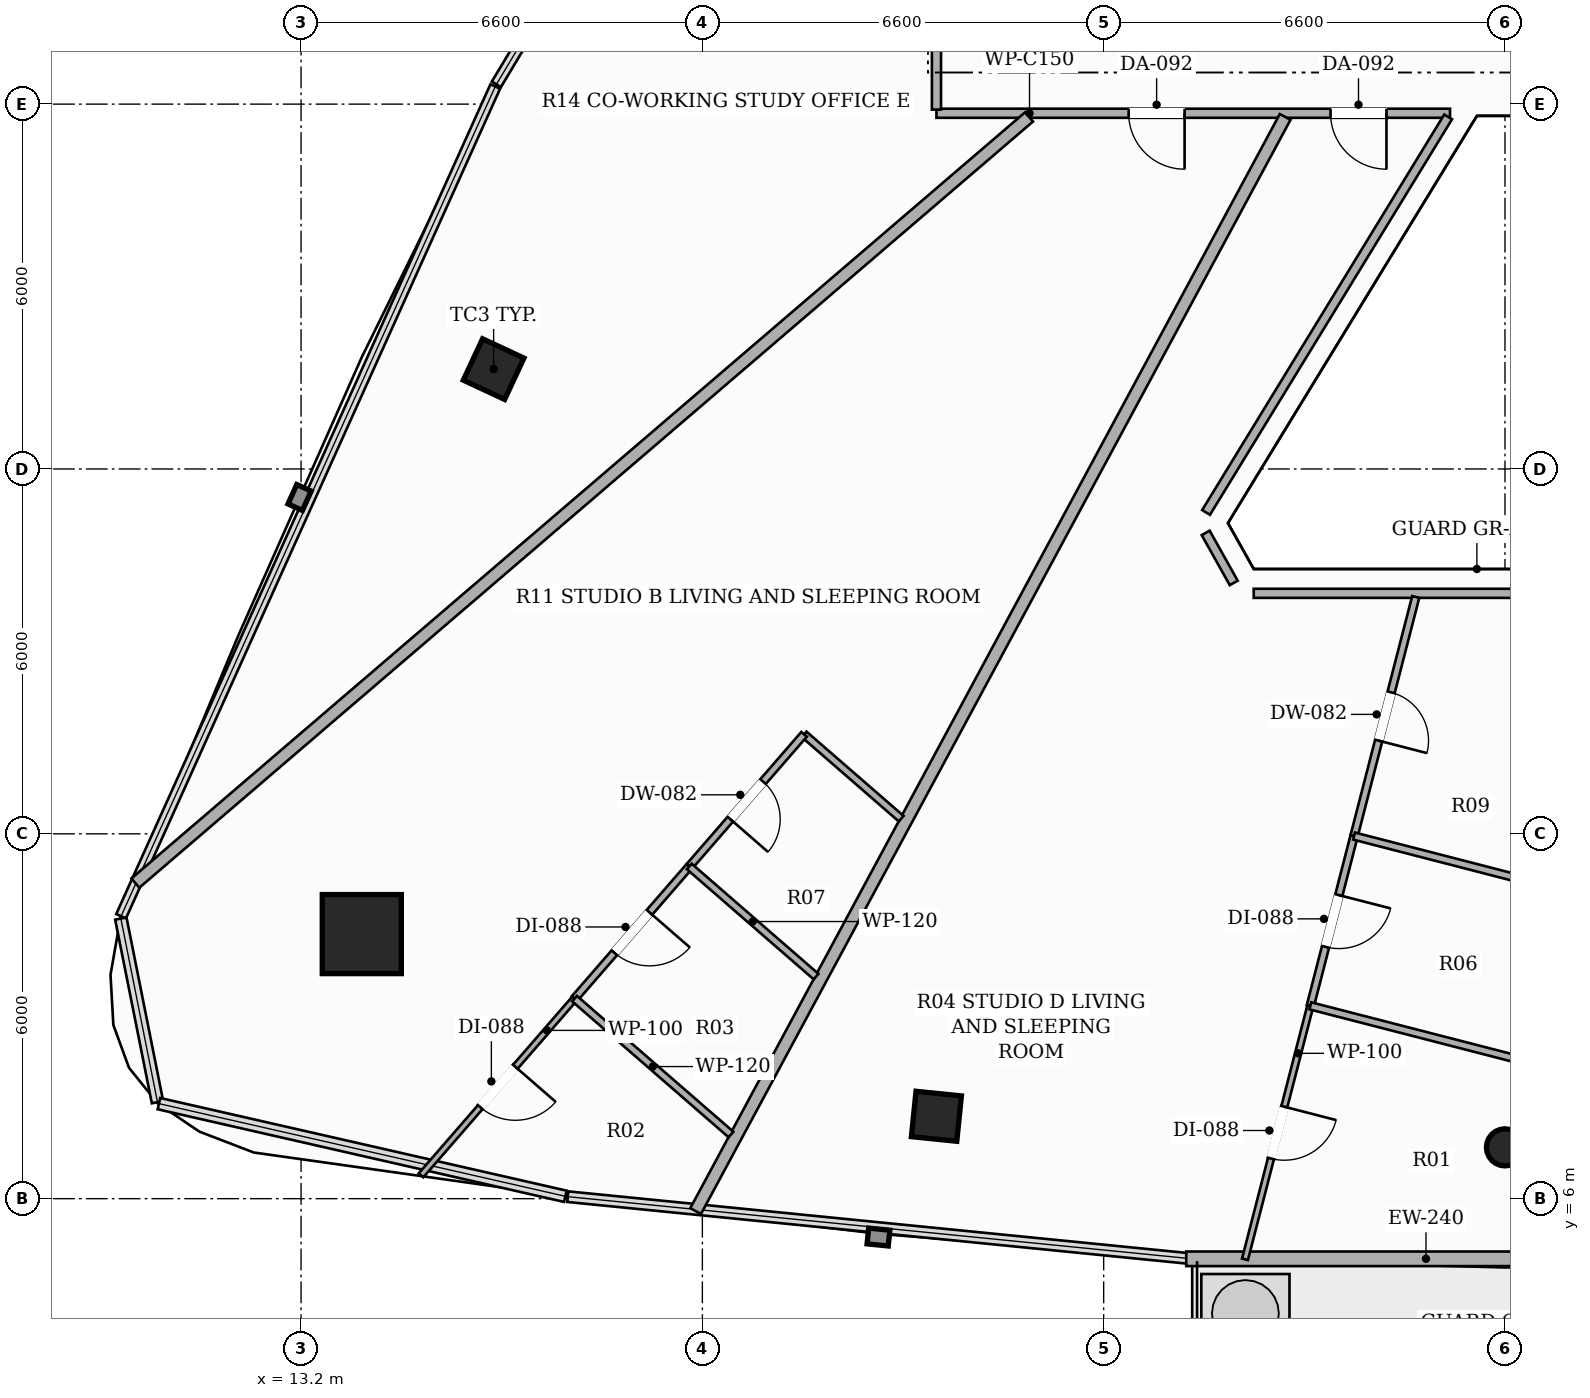
"""IFC4 building model, lengths in metres.
Left out: names, types, materials, properties, quantities, classifications, styles, units other than length and angle.
Written with IfcOpenShell. Run it as: python <this file> out.ifc"""

import sys

from ifc_helpers import new_model, si_unit, direction, frame, frame_2d, origin, origin_2d, place, context, subcontext, project, spatial, rectangle, hollow_rectangle, hollow_circle, extrude, element, fill, save


model = new_model("IFC4")
c1 = context("Model", 3, precision=1e-05, world=origin(), true_north=direction((0.0, 1.0)))
c2 = subcontext(c1, "Body", "Model", "MODEL_VIEW")
j1 = project(units=[si_unit("LENGTHUNIT", "METRE"), si_unit("PLANEANGLEUNIT", "RADIAN")], contexts=[c1])
p1 = place(None, origin())
s1 = spatial("IfcSite", under=j1, at=p1, CompositionType="ELEMENT")
p2 = place(p1, origin())
s2 = spatial("IfcBuilding", under=s1, at=p2, CompositionType="ELEMENT")
p3 = place(p2, frame((0.0, 0.0, 226.1)))
s3 = spatial("IfcBuildingStorey", under=s2, at=p3, CompositionType="ELEMENT", Elevation=226.1)
p4 = place(p3, frame((14.199, 10.351, 0.0), z_axis=(0.0, 0.0, 1.0), x_axis=(1.0, 0.0, 0.0)))
e1 = element("IfcColumn", 1, at=p4, inside=s3, PredefinedType="COLUMN", context=c2, shape_type="SweptSolid", body=[
    extrude(hollow_rectangle(XDim=1.3, YDim=1.3, WallThickness=0.04, at=origin_2d()), origin(), (0.0, 0.0, 1.0), 3.3),
])
for number, where, z_axis, x_axis in (
    (2, (16.367, 19.642, 0.0), (0.0, 0.0, 1.0), (0.423, 0.906, 0.0)),
    (3, (23.649, 7.355, 0.0), (0.0, 0.0, 1.0), (-0.995, 0.101, 0.0)),
):
    element("IfcColumn", number, at=place(p3, frame(where, z_axis=z_axis, x_axis=x_axis)), inside=s3, PredefinedType="COLUMN", context=c2, shape_type="SweptSolid", body=[
        extrude(hollow_rectangle(XDim=0.75, YDim=0.75, WallThickness=0.025, at=origin_2d()), origin(), (0.0, 0.0, 1.0), 3.3),
    ])
p5 = place(p3, frame((33.0, 6.844, 0.0), z_axis=(0.0, 0.0, 1.0), x_axis=(1.0, 0.0, 0.0)))
e4 = element("IfcColumn", 4, at=p5, inside=s3, PredefinedType="COLUMN", context=c2, shape_type="SweptSolid", body=[
    extrude(hollow_circle(Radius=0.305, WallThickness=0.016, at=origin_2d()), origin(), (0.0, 0.0, 1.0), 3.3),
])
p6 = place(p3, frame((27.758, 5.011, 0.0), z_axis=(0.0, 0.0, 1.0), x_axis=(1.0, 0.0, 0.0)))
e5 = element("IfcWall", 5, at=p6, inside=s3, PredefinedType="SOLIDWALL", context=c2, shape_type="SweptSolid", body=[
    extrude(rectangle(XDim=10.484, YDim=0.24, at=frame_2d((5.242, 0.0))), origin(), (0.0, 0.0, 1.0), 2.624),
])
p7 = place(p6, frame((7.986, 0.0, 0.0)))
e6 = element("IfcOpeningElement", 6, at=p7, cuts=e5, PredefinedType="OPENING", context=c2, shape_type="SweptSolid", body=[
    extrude(rectangle(XDim=1.8, YDim=2.2, at=frame_2d((0.9, 1.1))), frame((0.0, 0.13, 0.0), z_axis=(0.0, -1.0, 0.0), x_axis=(1.0, 0.0, 0.0)), (0.0, 0.0, 1.0), 0.26),
])
p8 = place(p3, frame((32.096, 23.85, 0.0), z_axis=(0.0, 0.0, 1.0), x_axis=(-1.0, 0.0, 0.0)))
e7 = element("IfcWall", 7, at=p8, inside=s3, PredefinedType="PARTITIONING", context=c2, shape_type="SweptSolid", body=[
    extrude(rectangle(XDim=8.446, YDim=0.15, at=frame_2d((4.223, 0.0))), origin(), (0.0, 0.0, 1.0), 2.565),
])
p9 = place(p8, frame((4.365, 0.0, 0.0)))
e8 = element("IfcOpeningElement", 8, at=p9, cuts=e7, PredefinedType="OPENING", context=c2, shape_type="SweptSolid", body=[
    extrude(rectangle(XDim=0.92, YDim=2.15, at=frame_2d((0.46, 1.075))), frame((0.0, 0.085, 0.0), z_axis=(0.0, -1.0, 0.0), x_axis=(1.0, 0.0, 0.0)), (0.0, 0.0, 1.0), 0.17),
])
p10 = place(p8, frame((1.045, 0.0, 0.0)))
e9 = element("IfcOpeningElement", 9, at=p10, cuts=e7, PredefinedType="OPENING", context=c2, shape_type="SweptSolid", body=[
    extrude(rectangle(XDim=0.92, YDim=2.15, at=frame_2d((0.46, 1.075))), frame((0.0, 0.085, 0.0), z_axis=(0.0, -1.0, 0.0), x_axis=(1.0, 0.0, 0.0)), (0.0, 0.0, 1.0), 0.17),
])
p11 = place(p3, frame((23.65, 23.91, 0.0), z_axis=(0.0, 0.0, 1.0), x_axis=(0.0, 1.0, 0.0)))
e10 = element("IfcWall", 10, at=p11, inside=s3, PredefinedType="PARTITIONING", context=c2, shape_type="SweptSolid", body=[
    extrude(rectangle(XDim=11.888, YDim=0.15, at=frame_2d((5.944, 0.0))), origin(), (0.0, 0.0, 1.0), 2.492),
])
p12 = place(p11, frame((5.504, 0.0, 0.0)))
e11 = element("IfcOpeningElement", 11, at=p12, cuts=e10, PredefinedType="OPENING", context=c2, shape_type="SweptSolid", body=[
    extrude(rectangle(XDim=0.88, YDim=2.1, at=frame_2d((0.44, 1.05))), frame((0.0, 0.085, 0.0), z_axis=(0.0, -1.0, 0.0), x_axis=(1.0, 0.0, 0.0)), (0.0, 0.0, 1.0), 0.17),
])
p13 = place(p3, frame((37.132, 15.955, 0.0), z_axis=(0.0, 0.0, 1.0), x_axis=(-1.0, 0.0, 0.0)))
e12 = element("IfcWall", 12, at=p13, inside=s3, PredefinedType="PARTITIONING", context=c2, shape_type="SweptSolid", body=[
    extrude(rectangle(XDim=8.264, YDim=0.15, at=frame_2d((4.132, 0.0))), origin(), (0.0, 0.0, 1.0), 2.773),
])
p14 = place(p3, frame((28.539, 16.126, 0.0), z_axis=(0.0, 0.0, 1.0), x_axis=(-0.488847636641, 0.87236918111, 0.0)))
e13 = element("IfcWall", 13, at=p14, inside=s3, PredefinedType="PARTITIONING", context=c2, shape_type="SweptSolid", body=[
    extrude(rectangle(XDim=0.943, YDim=0.15, at=frame_2d((0.472, 0.0))), origin(), (0.0, 0.0, 1.0), 3.06),
])
p15 = place(p3, frame((28.084, 17.285, 0.0), z_axis=(0.0, 0.0, 1.0), x_axis=(0.521984684225, 0.852954857794, 0.0)))
e14 = element("IfcWall", 14, at=p15, inside=s3, PredefinedType="PARTITIONING", context=c2, shape_type="SweptSolid", body=[
    extrude(rectangle(XDim=7.626, YDim=0.15, at=frame_2d((3.813, 0.0))), origin(), (0.0, 0.0, 1.0), 2.773),
])
p16 = place(p3, frame((29.385, 23.79, 0.0), z_axis=(0.0, 0.0, 1.0), x_axis=(-0.474361203305, -0.880330306646, 0.0)))
e15 = element("IfcWall", 15, at=p16, inside=s3, PredefinedType="PARTITIONING", context=c2, shape_type="SweptSolid", body=[
    extrude(rectangle(XDim=20.44, YDim=0.2, at=frame_2d((10.22, 0.0))), origin(), (0.0, 0.0, 1.0), 2.492),
])
p17 = place(p3, frame((10.475, 11.19, 0.0), z_axis=(0.0, 0.0, 1.0), x_axis=(0.759210311249, 0.650845375871, 0.0)))
e16 = element("IfcWall", 16, at=p17, inside=s3, PredefinedType="PARTITIONING", context=c2, shape_type="SweptSolid", body=[
    extrude(rectangle(XDim=19.36, YDim=0.2, at=frame_2d((9.68, 0.0))), origin(), (0.0, 0.0, 1.0), 2.492),
])
p18 = place(p3, frame((23.07, 12.249, 0.0), z_axis=(0.0, 0.0, 1.0), x_axis=(-0.75504514731, 0.655672803709, 0.0)))
e17 = element("IfcWall", 17, at=p18, inside=s3, PredefinedType="PARTITIONING", context=c2, shape_type="SweptSolid", body=[
    extrude(rectangle(XDim=2.115, YDim=0.12, at=frame_2d((1.058, 0.0))), origin(), (0.0, 0.0, 1.0), 2.773),
])
p19 = place(p3, frame((21.473, 13.636, 0.0), z_axis=(0.0, 0.0, 1.0), x_axis=(-0.655840593364, -0.754899407932, 0.0)))
e18 = element("IfcWall", 18, at=p19, inside=s3, PredefinedType="PARTITIONING", context=c2, shape_type="SweptSolid", body=[
    extrude(rectangle(XDim=2.879, YDim=0.12, at=frame_2d((1.439, 0.0))), origin(), (0.0, 0.0, 1.0), 2.773),
])
p20 = place(p19, frame((1.029, 0.0, 0.0)))
e19 = element("IfcOpeningElement", 19, at=p20, cuts=e18, PredefinedType="OPENING", context=c2, shape_type="SweptSolid", body=[
    extrude(rectangle(XDim=0.82, YDim=2.1, at=frame_2d((0.41, 1.05))), frame((0.0, 0.07, 0.0), z_axis=(0.0, -1.0, 0.0), x_axis=(1.0, 0.0, 0.0)), (0.0, 0.0, 1.0), 0.14),
])
p21 = place(p3, frame((19.585, 11.463, 0.0), z_axis=(0.0, 0.0, 1.0), x_axis=(-0.655689200825, -0.755030907924, 0.0)))
e20 = element("IfcWall", 20, at=p21, inside=s3, PredefinedType="PARTITIONING", context=c2, shape_type="SweptSolid", body=[
    extrude(rectangle(XDim=2.878, YDim=0.12, at=frame_2d((1.439, 0.0))), origin(), (0.0, 0.0, 1.0), 2.492),
])
p22 = place(p21, frame((0.999, 0.0, 0.0)))
e21 = element("IfcOpeningElement", 21, at=p22, cuts=e20, PredefinedType="OPENING", context=c2, shape_type="SweptSolid", body=[
    extrude(rectangle(XDim=0.88, YDim=2.1, at=frame_2d((0.44, 1.05))), frame((0.0, 0.07, 0.0), z_axis=(0.0, -1.0, 0.0), x_axis=(1.0, 0.0, 0.0)), (0.0, 0.0, 1.0), 0.14),
])
p23 = place(p3, frame((17.698, 9.29, 0.0), z_axis=(0.0, 0.0, 1.0), x_axis=(-0.655874061554, -0.754870330176, 0.0)))
e22 = element("IfcWall", 22, at=p23, inside=s3, PredefinedType="PARTITIONING", context=c2, shape_type="SweptSolid", body=[
    extrude(rectangle(XDim=3.85, YDim=0.1, at=frame_2d((1.925, 0.0))), origin(), (0.0, 0.0, 1.0), 2.492),
])
p24 = place(p23, frame((1.485, 0.0, 0.0)))
e23 = element("IfcOpeningElement", 23, at=p24, cuts=e22, PredefinedType="OPENING", context=c2, shape_type="SweptSolid", body=[
    extrude(rectangle(XDim=0.88, YDim=2.1, at=frame_2d((0.44, 1.05))), frame((0.0, 0.06, 0.0), z_axis=(0.0, -1.0, 0.0), x_axis=(1.0, 0.0, 0.0)), (0.0, 0.0, 1.0), 0.12),
])
p25 = place(p3, frame((21.67, 9.652, 0.0), z_axis=(0.0, 0.0, 1.0), x_axis=(-0.755003171317, 0.655721138367, 0.0)))
e24 = element("IfcWall", 24, at=p25, inside=s3, PredefinedType="PARTITIONING", context=c2, shape_type="SweptSolid", body=[
    extrude(rectangle(XDim=2.761, YDim=0.12, at=frame_2d((1.381, 0.0))), origin(), (0.0, 0.0, 1.0), 2.773),
])
p26 = place(p3, frame((20.271, 7.055, 0.0), z_axis=(0.0, 0.0, 1.0), x_axis=(-0.754936987289, 0.65579733548, 0.0)))
e25 = element("IfcWall", 25, at=p26, inside=s3, PredefinedType="PARTITIONING", context=c2, shape_type="SweptSolid", body=[
    extrude(rectangle(XDim=3.408, YDim=0.12, at=frame_2d((1.704, 0.0))), origin(), (0.0, 0.0, 1.0), 2.492),
])
p27 = place(p3, frame((31.532, 15.895, 0.0), z_axis=(0.0, 0.0, 1.0), x_axis=(-0.24968708983, -0.968326575682, 0.0)))
e26 = element("IfcWall", 26, at=p27, inside=s3, PredefinedType="PARTITIONING", context=c2, shape_type="SweptSolid", body=[
    extrude(rectangle(XDim=4.061, YDim=0.12, at=frame_2d((2.03, 0.0))), origin(), (0.0, 0.0, 1.0), 3.06),
])
p28 = place(p27, frame((1.62, 0.0, 0.0)))
e27 = element("IfcOpeningElement", 27, at=p28, cuts=e26, PredefinedType="OPENING", context=c2, shape_type="SweptSolid", body=[
    extrude(rectangle(XDim=0.82, YDim=2.1, at=frame_2d((0.41, 1.05))), frame((0.0, 0.07, 0.0), z_axis=(0.0, -1.0, 0.0), x_axis=(1.0, 0.0, 0.0)), (0.0, 0.0, 1.0), 0.14),
])
p29 = place(p3, frame((30.518, 11.963, 0.0), z_axis=(0.0, 0.0, 1.0), x_axis=(-0.249383700926, -0.968404755106, 0.0)))
e28 = element("IfcWall", 28, at=p29, inside=s3, PredefinedType="PARTITIONING", context=c2, shape_type="SweptSolid", body=[
    extrude(rectangle(XDim=2.883, YDim=0.12, at=frame_2d((1.441, 0.0))), origin(), (0.0, 0.0, 1.0), 3.06),
])
p30 = place(p29, frame((1.002, 0.0, 0.0)))
e29 = element("IfcOpeningElement", 29, at=p30, cuts=e28, PredefinedType="OPENING", context=c2, shape_type="SweptSolid", body=[
    extrude(rectangle(XDim=0.88, YDim=2.1, at=frame_2d((0.44, 1.05))), frame((0.0, 0.07, 0.0), z_axis=(0.0, -1.0, 0.0), x_axis=(1.0, 0.0, 0.0)), (0.0, 0.0, 1.0), 0.14),
])
p31 = place(p3, frame((29.799, 9.171, 0.0), z_axis=(0.0, 0.0, 1.0), x_axis=(-0.249680784234, -0.968328201585, 0.0)))
e30 = element("IfcWall", 30, at=p31, inside=s3, PredefinedType="PARTITIONING", context=c2, shape_type="SweptSolid", body=[
    extrude(rectangle(XDim=4.305, YDim=0.1, at=frame_2d((2.153, 0.0))), origin(), (0.0, 0.0, 1.0), 2.492),
])
p32 = place(p31, frame((1.713, 0.0, 0.0)))
e31 = element("IfcOpeningElement", 31, at=p32, cuts=e30, PredefinedType="OPENING", context=c2, shape_type="SweptSolid", body=[
    extrude(rectangle(XDim=0.88, YDim=2.1, at=frame_2d((0.44, 1.05))), frame((0.0, 0.06, 0.0), z_axis=(0.0, -1.0, 0.0), x_axis=(1.0, 0.0, 0.0)), (0.0, 0.0, 1.0), 0.12),
])
p33 = place(p3, frame((33.355, 11.231, 0.0), z_axis=(0.0, 0.0, 1.0), x_axis=(-0.968291630449, 0.249822573846, 0.0)))
e32 = element("IfcWall", 32, at=p33, inside=s3, PredefinedType="PARTITIONING", context=c2, shape_type="SweptSolid", body=[
    extrude(rectangle(XDim=2.93, YDim=0.12, at=frame_2d((1.465, 0.0))), origin(), (0.0, 0.0, 1.0), 2.773),
])
p34 = place(p3, frame((33.424, 8.237, 0.0), z_axis=(0.0, 0.0, 1.0), x_axis=(-0.968383623763, 0.249465743595, 0.0)))
e33 = element("IfcWall", 33, at=p34, inside=s3, PredefinedType="PARTITIONING", context=c2, shape_type="SweptSolid", body=[
    extrude(rectangle(XDim=3.743, YDim=0.12, at=frame_2d((1.872, 0.0))), origin(), (0.0, 0.0, 1.0), 2.773),
])
p35 = place(p9, origin())
e34 = element("IfcDoor", 34, at=p35, inside=s3, OperationType="SINGLE_SWING_LEFT", PredefinedType="DOOR", context=c2, shape_type="SweptSolid", body=[
    extrude(rectangle(XDim=0.92, YDim=2.15, at=frame_2d((0.46, 1.075))), frame((0.0, 0.025, 0.0), z_axis=(0.0, -1.0, 0.0), x_axis=(1.0, 0.0, 0.0)), (0.0, 0.0, 1.0), 0.05),
])
fill(e8, e34)
p36 = place(p20, origin())
e35 = element("IfcDoor", 35, at=p36, inside=s3, OperationType="SINGLE_SWING_RIGHT", PredefinedType="DOOR", context=c2, shape_type="SweptSolid", body=[
    extrude(rectangle(XDim=0.82, YDim=2.1, at=frame_2d((0.41, 1.05))), frame((0.0, 0.025, 0.0), z_axis=(0.0, -1.0, 0.0), x_axis=(1.0, 0.0, 0.0)), (0.0, 0.0, 1.0), 0.05),
])
fill(e19, e35)
p37 = place(p22, origin())
e36 = element("IfcDoor", 36, at=p37, inside=s3, OperationType="SINGLE_SWING_LEFT", PredefinedType="DOOR", context=c2, shape_type="SweptSolid", body=[
    extrude(rectangle(XDim=0.88, YDim=2.1, at=frame_2d((0.44, 1.05))), frame((0.0, 0.025, 0.0), z_axis=(0.0, -1.0, 0.0), x_axis=(1.0, 0.0, 0.0)), (0.0, 0.0, 1.0), 0.05),
])
fill(e21, e36)
p38 = place(p24, origin())
e37 = element("IfcDoor", 37, at=p38, inside=s3, OperationType="SINGLE_SWING_LEFT", PredefinedType="DOOR", context=c2, shape_type="SweptSolid", body=[
    extrude(rectangle(XDim=0.88, YDim=2.1, at=frame_2d((0.44, 1.05))), frame((0.0, 0.025, 0.0), z_axis=(0.0, -1.0, 0.0), x_axis=(1.0, 0.0, 0.0)), (0.0, 0.0, 1.0), 0.05),
])
fill(e23, e37)
p39 = place(p10, origin())
e38 = element("IfcDoor", 38, at=p39, inside=s3, OperationType="SINGLE_SWING_LEFT", PredefinedType="DOOR", context=c2, shape_type="SweptSolid", body=[
    extrude(rectangle(XDim=0.92, YDim=2.15, at=frame_2d((0.46, 1.075))), frame((0.0, 0.025, 0.0), z_axis=(0.0, -1.0, 0.0), x_axis=(1.0, 0.0, 0.0)), (0.0, 0.0, 1.0), 0.05),
])
fill(e9, e38)
p40 = place(p28, origin())
e39 = element("IfcDoor", 39, at=p40, inside=s3, OperationType="SINGLE_SWING_RIGHT", PredefinedType="DOOR", context=c2, shape_type="SweptSolid", body=[
    extrude(rectangle(XDim=0.82, YDim=2.1, at=frame_2d((0.41, 1.05))), frame((0.0, 0.025, 0.0), z_axis=(0.0, -1.0, 0.0), x_axis=(1.0, 0.0, 0.0)), (0.0, 0.0, 1.0), 0.05),
])
fill(e27, e39)
p41 = place(p30, origin())
e40 = element("IfcDoor", 40, at=p41, inside=s3, OperationType="SINGLE_SWING_LEFT", PredefinedType="DOOR", context=c2, shape_type="SweptSolid", body=[
    extrude(rectangle(XDim=0.88, YDim=2.1, at=frame_2d((0.44, 1.05))), frame((0.0, 0.025, 0.0), z_axis=(0.0, -1.0, 0.0), x_axis=(1.0, 0.0, 0.0)), (0.0, 0.0, 1.0), 0.05),
])
fill(e29, e40)
p42 = place(p32, origin())
e41 = element("IfcDoor", 41, at=p42, inside=s3, OperationType="SINGLE_SWING_LEFT", PredefinedType="DOOR", context=c2, shape_type="SweptSolid", body=[
    extrude(rectangle(XDim=0.88, YDim=2.1, at=frame_2d((0.44, 1.05))), frame((0.0, 0.025, 0.0), z_axis=(0.0, -1.0, 0.0), x_axis=(1.0, 0.0, 0.0)), (0.0, 0.0, 1.0), 0.05),
])
fill(e31, e41)
save(model, sys.argv[1])
